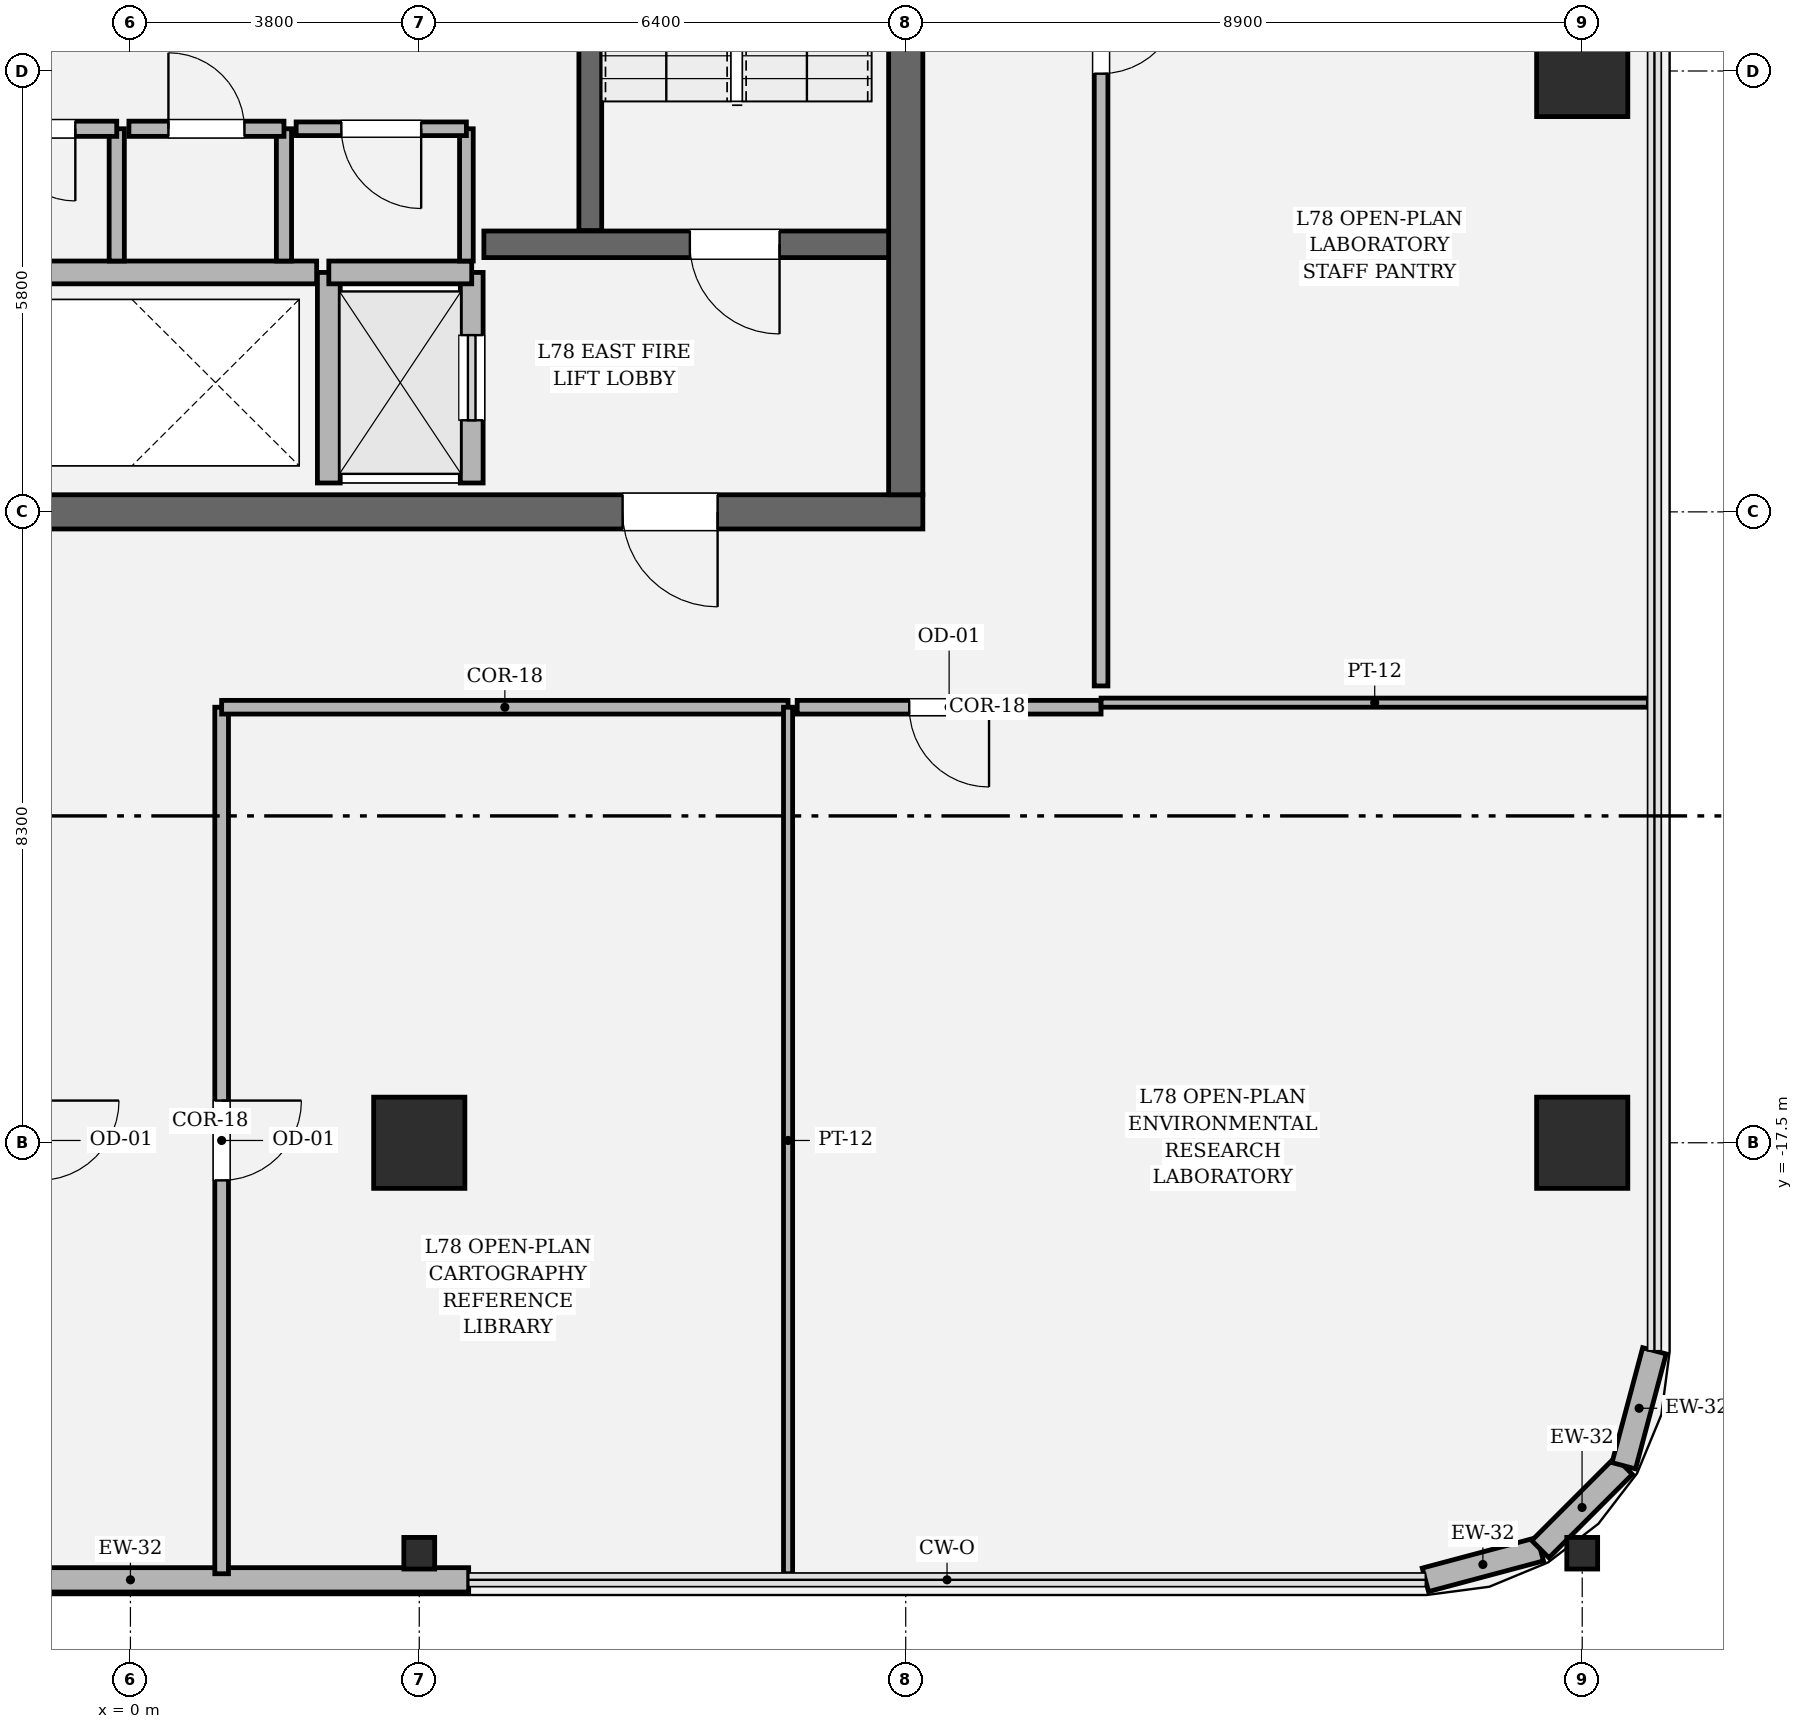
"""IFC4 building model, lengths in metres.
Left out: names, types, materials, properties, quantities, classifications, styles, units other than length and angle.
Written with IfcOpenShell. Run it as: python <this file> out.ifc"""

import sys

from ifc_helpers import new_model, si_unit, direction, frame, frame_2d, origin, origin_2d, place, context, subcontext, project, spatial, rectangle, hollow_rectangle, i_section, extrude, element, fill, save


model = new_model("IFC4")
c1 = context("Model", 3, precision=1e-05, world=origin(), true_north=direction((0.0, 1.0)))
c2 = subcontext(c1, "Body", "Model", "MODEL_VIEW")
j1 = project(units=[si_unit("LENGTHUNIT", "METRE"), si_unit("PLANEANGLEUNIT", "RADIAN")], contexts=[c1])
p1 = place(None, origin())
s1 = spatial("IfcSite", under=j1, at=p1, CompositionType="ELEMENT")
p2 = place(p1, origin())
s2 = spatial("IfcBuilding", under=s1, at=p2, CompositionType="ELEMENT")
p3 = place(p2, frame((0.0, 0.0, 330.0)))
s3 = spatial("IfcBuildingStorey", under=s2, at=p3, CompositionType="ELEMENT", Elevation=330.0)
p4 = place(p3, frame((10.425, -9.2, 0.0), z_axis=(0.0, 0.0, 1.0), x_axis=(-1.0, 0.0, 0.0)))
e1 = element("IfcWall", 1, at=p4, inside=s3, PredefinedType="SHEAR", context=c2, shape_type="SweptSolid", body=[
    extrude(rectangle(XDim=20.85, YDim=0.45, at=frame_2d((10.425, 0.0))), origin(), (0.0, 0.0, 1.0), 4.2),
])
p5 = place(p4, frame((2.7, 0.0, 0.0)))
e2 = element("IfcOpeningElement", 2, at=p5, cuts=e1, PredefinedType="OPENING", context=c2, shape_type="SweptSolid", body=[
    extrude(rectangle(XDim=1.25, YDim=2.25, at=frame_2d((0.625, 1.125))), frame((0.0, 0.235, 0.0), z_axis=(0.0, -1.0, 0.0), x_axis=(1.0, 0.0, 0.0)), (0.0, 0.0, 1.0), 0.47),
])
p6 = place(p4, frame((16.9, 0.0, 0.0)))
e3 = element("IfcOpeningElement", 3, at=p6, cuts=e1, PredefinedType="OPENING", context=c2, shape_type="SweptSolid", body=[
    extrude(rectangle(XDim=1.25, YDim=2.25, at=frame_2d((0.625, 1.125))), frame((0.0, 0.235, 0.0), z_axis=(0.0, -1.0, 0.0), x_axis=(1.0, 0.0, 0.0)), (0.0, 0.0, 1.0), 0.47),
])
p7 = place(p3, frame((10.2, 8.975, 0.0), z_axis=(0.0, 0.0, 1.0), x_axis=(0.0, -1.0, 0.0)))
e4 = element("IfcWall", 4, at=p7, inside=s3, PredefinedType="SHEAR", context=c2, shape_type="SweptSolid", body=[
    extrude(rectangle(XDim=17.95, YDim=0.45, at=frame_2d((8.975, 0.0))), origin(), (0.0, 0.0, 1.0), 4.2),
])
p8 = place(p7, frame((4.005, 0.0, 0.0)))
e5 = element("IfcOpeningElement", 5, at=p8, cuts=e4, PredefinedType="OPENING", context=c2, shape_type="SweptSolid", body=[
    extrude(rectangle(XDim=1.18, YDim=2.2, at=frame_2d((0.59, 1.1))), frame((0.0, 0.235, 0.0), z_axis=(0.0, -1.0, 0.0), x_axis=(1.0, 0.0, 0.0)), (0.0, 0.0, 1.0), 0.47),
])
p9 = place(p3, frame((6.05, 3.45, 0.0), z_axis=(0.0, 0.0, 1.0), x_axis=(0.0, -1.0, 0.0)))
e6 = element("IfcWall", 6, at=p9, inside=s3, PredefinedType="SOLIDWALL", context=c2, shape_type="SweptSolid", body=[
    extrude(rectangle(XDim=8.95, YDim=0.3, at=frame_2d((4.475, 0.0))), origin(), (0.0, 0.0, 1.0), 4.2),
])
p10 = place(p3, frame((4.65, -5.68, 0.0), z_axis=(0.0, 0.0, 1.0), x_axis=(1.0, 0.0, 0.0)))
e7 = element("IfcWall", 7, at=p10, inside=s3, PredefinedType="SOLIDWALL", context=c2, shape_type="SweptSolid", body=[
    extrude(rectangle(XDim=5.325, YDim=0.35, at=frame_2d((2.663, 0.0))), origin(), (0.0, 0.0, 1.0), 4.2),
])
p11 = place(p10, frame((2.71, 0.0, 0.0)))
e8 = element("IfcOpeningElement", 8, at=p11, cuts=e7, PredefinedType="OPENING", context=c2, shape_type="SweptSolid", body=[
    extrude(rectangle(XDim=1.18, YDim=2.2, at=frame_2d((0.59, 1.1))), frame((0.0, 0.185, 0.0), z_axis=(0.0, -1.0, 0.0), x_axis=(1.0, 0.0, 0.0)), (0.0, 0.0, 1.0), 0.37),
])
for number, where, z_axis, x_axis in (
    (9, (3.8, -17.5, 0.0), (0.0, 0.0, 1.0), (1.0, 0.0, 0.0)),
    (10, (19.1, -17.5, 0.0), (0.0, 0.0, 1.0), (1.0, 0.0, 0.0)),
    (11, (19.1, -3.4, 0.0), (0.0, 0.0, 1.0), (1.0, 0.0, 0.0)),
):
    element("IfcColumn", number, at=place(p3, frame(where, z_axis=z_axis, x_axis=x_axis)), inside=s3, PredefinedType="COLUMN", context=c2, shape_type="SweptSolid", body=[
        extrude(hollow_rectangle(XDim=1.2, YDim=1.2, WallThickness=0.035, at=origin_2d()), origin(), (0.0, 0.0, 1.0), 4.2),
    ])
for number, where, z_axis, x_axis in (
    (12, (3.8, -22.9, 0.0), (0.0, 0.0, 1.0), (1.0, 0.0, 0.0)),
    (13, (19.1, -22.9, 0.0), (0.0, 0.0, 1.0), (1.0, 0.0, 0.0)),
):
    element("IfcColumn", number, at=place(p3, frame(where, z_axis=z_axis, x_axis=x_axis)), inside=s3, PredefinedType="COLUMN", context=c2, shape_type="SweptSolid", body=[
        extrude(i_section(OverallWidth=0.406, OverallDepth=0.416, WebThickness=0.029, FlangeThickness=0.048, FilletRadius=0.018, at=origin_2d()), origin(), (0.0, 0.0, 1.0), 4.198),
    ])
p12 = place(p3, frame((-4.45, -23.25, 0.0), z_axis=(0.0, 0.0, 1.0), x_axis=(1.0, 0.0, 0.0)))
e14 = element("IfcWall", 14, at=p12, inside=s3, PredefinedType="SOLIDWALL", context=c2, shape_type="SweptSolid", body=[
    extrude(rectangle(XDim=8.9, YDim=0.32, at=frame_2d((4.45, 0.0))), origin(), (0.0, 0.0, 1.0), 2.614),
])
p13 = place(p3, frame((17.037, -23.25, 0.0), z_axis=(0.0, 0.0, 1.0), x_axis=(0.966224582397, 0.257701486942, 0.0)))
e15 = element("IfcWall", 15, at=p13, inside=s3, PredefinedType="SOLIDWALL", context=c2, shape_type="SweptSolid", body=[
    extrude(rectangle(XDim=1.565, YDim=0.32, at=frame_2d((0.783, 0.0))), origin(), (0.0, 0.0, 1.0), 2.614),
])
p14 = place(p3, frame((18.549, -22.847, 0.0), z_axis=(0.0, 0.0, 1.0), x_axis=(0.707028130747, 0.707185422879, 0.0)))
e16 = element("IfcWall", 16, at=p14, inside=s3, PredefinedType="SOLIDWALL", context=c2, shape_type="SweptSolid", body=[
    extrude(rectangle(XDim=1.552, YDim=0.32, at=frame_2d((0.776, 0.0))), origin(), (0.0, 0.0, 1.0), 2.614),
])
p15 = place(p3, frame((19.646, -21.749, 0.0), z_axis=(0.0, 0.0, 1.0), x_axis=(0.257847112249, 0.966185730957, 0.0)))
e17 = element("IfcWall", 17, at=p15, inside=s3, PredefinedType="SOLIDWALL", context=c2, shape_type="SweptSolid", body=[
    extrude(rectangle(XDim=1.565, YDim=0.32, at=frame_2d((0.783, 0.0))), origin(), (0.0, 0.0, 1.0), 3.94),
])
p16 = place(p3, frame((4.49, -8.82, 0.0), z_axis=(0.0, 0.0, 1.0), x_axis=(0.0, 1.0, 0.0)))
e18 = element("IfcWall", 18, at=p16, inside=s3, PredefinedType="SOLIDWALL", context=c2, shape_type="SweptSolid", body=[
    extrude(rectangle(XDim=2.77, YDim=0.3, at=frame_2d((1.385, 0.0))), origin(), (0.0, 0.0, 1.0), 3.94),
])
p17 = place(p16, frame((0.825, 0.0, 0.0)))
e19 = element("IfcOpeningElement", 19, at=p17, cuts=e18, PredefinedType="OPENING", context=c2, shape_type="SweptSolid", body=[
    extrude(rectangle(XDim=1.12, YDim=2.25, at=frame_2d((0.56, 1.125))), frame((0.0, 0.16, 0.0), z_axis=(0.0, -1.0, 0.0), x_axis=(1.0, 0.0, 0.0)), (0.0, 0.0, 1.0), 0.32),
])
p18 = place(p3, frame((2.61, -8.82, 0.0), z_axis=(0.0, 0.0, 1.0), x_axis=(0.0, 1.0, 0.0)))
e20 = element("IfcWall", 20, at=p18, inside=s3, PredefinedType="SOLIDWALL", context=c2, shape_type="SweptSolid", body=[
    extrude(rectangle(XDim=2.77, YDim=0.3, at=frame_2d((1.385, 0.0))), origin(), (0.0, 0.0, 1.0), 3.94),
])
p19 = place(p3, frame((2.61, -6.05, 0.0), z_axis=(0.0, 0.0, 1.0), x_axis=(1.0, 0.0, 0.0)))
e21 = element("IfcWall", 21, at=p19, inside=s3, PredefinedType="SOLIDWALL", context=c2, shape_type="SweptSolid", body=[
    extrude(rectangle(XDim=1.88, YDim=0.3, at=frame_2d((0.94, 0.0))), origin(), (0.0, 0.0, 1.0), 3.94),
])
p20 = place(p3, frame((-2.45, -6.05, 0.0), z_axis=(0.0, 0.0, 1.0), x_axis=(1.0, 0.0, 0.0)))
e22 = element("IfcWall", 22, at=p20, inside=s3, PredefinedType="SOLIDWALL", context=c2, shape_type="SweptSolid", body=[
    extrude(rectangle(XDim=4.9, YDim=0.3, at=frame_2d((2.45, 0.0))), origin(), (0.0, 0.0, 1.0), 3.94),
])
p21 = place(p3, frame((-0.18, -5.9, 0.0), z_axis=(0.0, 0.0, 1.0), x_axis=(0.0, 1.0, 0.0)))
e23 = element("IfcWall", 23, at=p21, inside=s3, PredefinedType="SOLIDWALL", context=c2, shape_type="SweptSolid", body=[
    extrude(rectangle(XDim=1.74, YDim=0.2, at=frame_2d((0.87, 0.0))), origin(), (0.0, 0.0, 1.0), 3.94),
])
p22 = place(p3, frame((-0.18, -4.16, 0.0), z_axis=(0.0, 0.0, 1.0), x_axis=(-1.0, 0.0, 0.0)))
e24 = element("IfcWall", 24, at=p22, inside=s3, PredefinedType="SOLIDWALL", context=c2, shape_type="SweptSolid", body=[
    extrude(rectangle(XDim=2.04, YDim=0.2, at=frame_2d((1.02, 0.0))), origin(), (0.0, 0.0, 1.0), 3.94),
])
p23 = place(p22, frame((0.545, 0.0, 0.0)))
e25 = element("IfcOpeningElement", 25, at=p23, cuts=e24, PredefinedType="OPENING", context=c2, shape_type="SweptSolid", body=[
    extrude(rectangle(XDim=0.95, YDim=2.15, at=frame_2d((0.475, 1.075))), frame((0.0, 0.11, 0.0), z_axis=(0.0, -1.0, 0.0), x_axis=(1.0, 0.0, 0.0)), (0.0, 0.0, 1.0), 0.22),
])
p24 = place(p3, frame((2.02, -5.9, 0.0), z_axis=(0.0, 0.0, 1.0), x_axis=(0.0, 1.0, 0.0)))
e26 = element("IfcWall", 26, at=p24, inside=s3, PredefinedType="SOLIDWALL", context=c2, shape_type="SweptSolid", body=[
    extrude(rectangle(XDim=1.74, YDim=0.2, at=frame_2d((0.87, 0.0))), origin(), (0.0, 0.0, 1.0), 3.94),
])
p25 = place(p3, frame((2.02, -4.16, 0.0), z_axis=(0.0, 0.0, 1.0), x_axis=(-1.0, 0.0, 0.0)))
e27 = element("IfcWall", 27, at=p25, inside=s3, PredefinedType="SOLIDWALL", context=c2, shape_type="SweptSolid", body=[
    extrude(rectangle(XDim=2.04, YDim=0.2, at=frame_2d((1.02, 0.0))), origin(), (0.0, 0.0, 1.0), 3.94),
])
p26 = place(p25, frame((0.52, 0.0, 0.0)))
e28 = element("IfcOpeningElement", 28, at=p26, cuts=e27, PredefinedType="OPENING", context=c2, shape_type="SweptSolid", body=[
    extrude(rectangle(XDim=1.0, YDim=2.15, at=frame_2d((0.5, 1.075))), frame((0.0, 0.11, 0.0), z_axis=(0.0, -1.0, 0.0), x_axis=(1.0, 0.0, 0.0)), (0.0, 0.0, 1.0), 0.22),
])
p27 = place(p3, frame((4.42, -5.9, 0.0), z_axis=(0.0, 0.0, 1.0), x_axis=(0.0, 1.0, 0.0)))
e29 = element("IfcWall", 29, at=p27, inside=s3, PredefinedType="PARTITIONING", context=c2, shape_type="SweptSolid", body=[
    extrude(rectangle(XDim=1.74, YDim=0.18, at=frame_2d((0.87, 0.0))), origin(), (0.0, 0.0, 1.0), 3.94),
])
p28 = place(p3, frame((4.42, -4.16, 0.0), z_axis=(0.0, 0.0, 1.0), x_axis=(-1.0, 0.0, 0.0)))
e30 = element("IfcWall", 30, at=p28, inside=s3, PredefinedType="PARTITIONING", context=c2, shape_type="SweptSolid", body=[
    extrude(rectangle(XDim=2.24, YDim=0.18, at=frame_2d((1.12, 0.0))), origin(), (0.0, 0.0, 1.0), 3.94),
])
p29 = place(p28, frame((0.595, 0.0, 0.0)))
e31 = element("IfcOpeningElement", 31, at=p29, cuts=e30, PredefinedType="OPENING", context=c2, shape_type="SweptSolid", body=[
    extrude(rectangle(XDim=1.05, YDim=2.2, at=frame_2d((0.525, 1.1))), frame((0.0, 0.1, 0.0), z_axis=(0.0, -1.0, 0.0), x_axis=(1.0, 0.0, 0.0)), (0.0, 0.0, 1.0), 0.2),
])
p30 = place(p3, frame((1.2, -23.17, 0.0), z_axis=(0.0, 0.0, 1.0), x_axis=(0.0, 1.0, 0.0)))
e32 = element("IfcWall", 32, at=p30, inside=s3, PredefinedType="PARTITIONING", context=c2, shape_type="SweptSolid", body=[
    extrude(rectangle(XDim=11.4, YDim=0.18, at=frame_2d((5.7, 0.0))), origin(), (0.0, 0.0, 1.0), 2.614),
])
p31 = place(p30, frame((5.175, 0.0, 0.0)))
e33 = element("IfcOpeningElement", 33, at=p31, cuts=e32, PredefinedType="OPENING", context=c2, shape_type="SweptSolid", body=[
    extrude(rectangle(XDim=1.05, YDim=2.2, at=frame_2d((0.525, 1.1))), frame((0.0, 0.1, 0.0), z_axis=(0.0, -1.0, 0.0), x_axis=(1.0, 0.0, 0.0)), (0.0, 0.0, 1.0), 0.2),
])
p32 = place(p3, frame((1.2, -11.77, 0.0), z_axis=(0.0, 0.0, 1.0), x_axis=(1.0, 0.0, 0.0)))
e34 = element("IfcWall", 34, at=p32, inside=s3, PredefinedType="PARTITIONING", context=c2, shape_type="SweptSolid", body=[
    extrude(rectangle(XDim=7.452, YDim=0.18, at=frame_2d((3.726, 0.0))), origin(), (0.0, 0.0, 1.0), 2.614),
])
p33 = place(p3, frame((8.652, -11.77, 0.0), z_axis=(0.0, 0.0, 1.0), x_axis=(0.0, -1.0, 0.0)))
e35 = element("IfcWall", 35, at=p33, inside=s3, PredefinedType="PARTITIONING", context=c2, shape_type="SweptSolid", body=[
    extrude(rectangle(XDim=11.4, YDim=0.12, at=frame_2d((5.7, 0.0))), origin(), (0.0, 0.0, 1.0), 2.614),
])
p34 = place(p3, frame((8.772, -11.77, 0.0), z_axis=(0.0, 0.0, 1.0), x_axis=(1.0, 0.0, 0.0)))
e36 = element("IfcWall", 36, at=p34, inside=s3, PredefinedType="PARTITIONING", context=c2, shape_type="SweptSolid", body=[
    extrude(rectangle(XDim=3.998, YDim=0.18, at=frame_2d((1.999, 0.0))), origin(), (0.0, 0.0, 1.0), 2.614),
])
p35 = place(p34, frame((1.474, 0.0, 0.0)))
e37 = element("IfcOpeningElement", 37, at=p35, cuts=e36, PredefinedType="OPENING", context=c2, shape_type="SweptSolid", body=[
    extrude(rectangle(XDim=1.05, YDim=2.2, at=frame_2d((0.525, 1.1))), frame((0.0, 0.1, 0.0), z_axis=(0.0, -1.0, 0.0), x_axis=(1.0, 0.0, 0.0)), (0.0, 0.0, 1.0), 0.2),
])
p36 = place(p3, frame((12.77, -11.71, 0.0), z_axis=(0.0, 0.0, 1.0), x_axis=(1.0, 0.0, 0.0)))
e38 = element("IfcWall", 38, at=p36, inside=s3, PredefinedType="PARTITIONING", context=c2, shape_type="SweptSolid", body=[
    extrude(rectangle(XDim=7.2, YDim=0.12, at=frame_2d((3.6, 0.0))), origin(), (0.0, 0.0, 1.0), 2.614),
])
p37 = place(p3, frame((12.77, -11.49, 0.0), z_axis=(0.0, 0.0, 1.0), x_axis=(0.0, 1.0, 0.0)))
e39 = element("IfcWall", 39, at=p37, inside=s3, PredefinedType="PARTITIONING", context=c2, shape_type="SweptSolid", body=[
    extrude(rectangle(XDim=17.16, YDim=0.18, at=frame_2d((8.58, 0.0))), origin(), (0.0, 0.0, 1.0), 2.614),
])
p38 = place(p37, frame((8.055, 0.0, 0.0)))
e40 = element("IfcOpeningElement", 40, at=p38, cuts=e39, PredefinedType="OPENING", context=c2, shape_type="SweptSolid", body=[
    extrude(rectangle(XDim=1.05, YDim=2.2, at=frame_2d((0.525, 1.1))), frame((0.0, 0.1, 0.0), z_axis=(0.0, -1.0, 0.0), x_axis=(1.0, 0.0, 0.0)), (0.0, 0.0, 1.0), 0.2),
])
p39 = place(p11, origin())
e41 = element("IfcDoor", 41, at=p39, inside=s3, OperationType="SINGLE_SWING_RIGHT", PredefinedType="DOOR", context=c2, shape_type="SweptSolid", body=[
    extrude(rectangle(XDim=1.18, YDim=2.2, at=frame_2d((0.59, 1.1))), frame((0.0, 0.025, 0.0), z_axis=(0.0, -1.0, 0.0), x_axis=(1.0, 0.0, 0.0)), (0.0, 0.0, 1.0), 0.05),
])
fill(e8, e41)
p40 = place(p5, origin())
e42 = element("IfcDoor", 42, at=p40, inside=s3, OperationType="SINGLE_SWING_LEFT", PredefinedType="DOOR", context=c2, shape_type="SweptSolid", body=[
    extrude(rectangle(XDim=1.25, YDim=2.25, at=frame_2d((0.625, 1.125))), frame((0.0, 0.025, 0.0), z_axis=(0.0, -1.0, 0.0), x_axis=(1.0, 0.0, 0.0)), (0.0, 0.0, 1.0), 0.05),
])
fill(e2, e42)
p41 = place(p17, origin())
e43 = element("IfcDoor", 43, at=p41, inside=s3, OperationType="SLIDING_TO_RIGHT", PredefinedType="DOOR", context=c2, shape_type="SweptSolid", body=[
    extrude(rectangle(XDim=1.12, YDim=2.25, at=frame_2d((0.56, 1.125))), frame((0.0, 0.025, 0.0), z_axis=(0.0, -1.0, 0.0), x_axis=(1.0, 0.0, 0.0)), (0.0, 0.0, 1.0), 0.05),
])
fill(e19, e43)
p42 = place(p23, origin())
e44 = element("IfcDoor", 44, at=p42, inside=s3, OperationType="SINGLE_SWING_LEFT", PredefinedType="DOOR", context=c2, shape_type="SweptSolid", body=[
    extrude(rectangle(XDim=0.95, YDim=2.15, at=frame_2d((0.475, 1.075))), frame((0.0, 0.025, 0.0), z_axis=(0.0, -1.0, 0.0), x_axis=(1.0, 0.0, 0.0)), (0.0, 0.0, 1.0), 0.05),
])
fill(e25, e44)
p43 = place(p26, origin())
e45 = element("IfcDoor", 45, at=p43, inside=s3, OperationType="SINGLE_SWING_RIGHT", PredefinedType="DOOR", context=c2, shape_type="SweptSolid", body=[
    extrude(rectangle(XDim=1.0, YDim=2.15, at=frame_2d((0.5, 1.075))), frame((0.0, 0.025, 0.0), z_axis=(0.0, -1.0, 0.0), x_axis=(1.0, 0.0, 0.0)), (0.0, 0.0, 1.0), 0.05),
])
fill(e28, e45)
p44 = place(p29, origin())
e46 = element("IfcDoor", 46, at=p44, inside=s3, OperationType="SINGLE_SWING_LEFT", PredefinedType="DOOR", context=c2, shape_type="SweptSolid", body=[
    extrude(rectangle(XDim=1.05, YDim=2.2, at=frame_2d((0.525, 1.1))), frame((0.0, 0.025, 0.0), z_axis=(0.0, -1.0, 0.0), x_axis=(1.0, 0.0, 0.0)), (0.0, 0.0, 1.0), 0.05),
])
fill(e31, e46)
p45 = place(p31, origin())
e47 = element("IfcDoor", 47, at=p45, inside=s3, OperationType="SINGLE_SWING_RIGHT", PredefinedType="DOOR", context=c2, shape_type="SweptSolid", body=[
    extrude(rectangle(XDim=1.05, YDim=2.2, at=frame_2d((0.525, 1.1))), frame((0.0, 0.025, 0.0), z_axis=(0.0, -1.0, 0.0), x_axis=(1.0, 0.0, 0.0)), (0.0, 0.0, 1.0), 0.05),
])
fill(e33, e47)
p46 = place(p35, origin())
e48 = element("IfcDoor", 48, at=p46, inside=s3, OperationType="SINGLE_SWING_RIGHT", PredefinedType="DOOR", context=c2, shape_type="SweptSolid", body=[
    extrude(rectangle(XDim=1.05, YDim=2.2, at=frame_2d((0.525, 1.1))), frame((0.0, 0.025, 0.0), z_axis=(0.0, -1.0, 0.0), x_axis=(1.0, 0.0, 0.0)), (0.0, 0.0, 1.0), 0.05),
])
fill(e37, e48)
p47 = place(p38, origin())
e49 = element("IfcDoor", 49, at=p47, inside=s3, OperationType="SINGLE_SWING_RIGHT", PredefinedType="DOOR", context=c2, shape_type="SweptSolid", body=[
    extrude(rectangle(XDim=1.05, YDim=2.2, at=frame_2d((0.525, 1.1))), frame((0.0, 0.025, 0.0), z_axis=(0.0, -1.0, 0.0), x_axis=(1.0, 0.0, 0.0)), (0.0, 0.0, 1.0), 0.05),
])
fill(e40, e49)
save(model, sys.argv[1])
